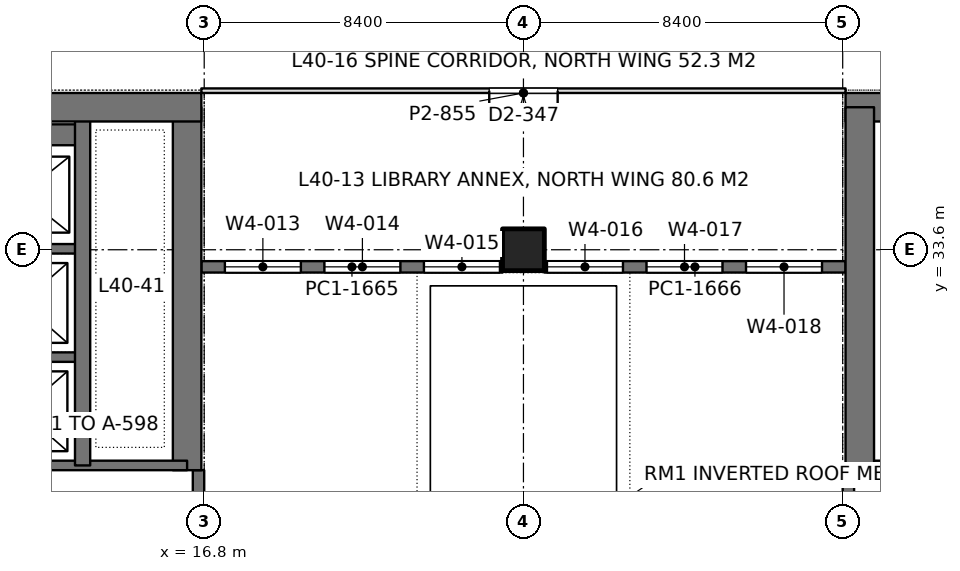
"""IFC4 building model, lengths in metres.
Left out: names, types, materials, properties, quantities, classifications, styles, units other than length and angle.
Written with IfcOpenShell. Run it as: python <this file> out.ifc"""

import sys

from ifc_helpers import new_model, si_unit, direction, frame, frame_2d, origin, origin_2d, place, context, subcontext, project, spatial, rectangle, extrude, element, fill, save


model = new_model("IFC4")
c1 = context("Model", 3, precision=1e-05, world=origin(), true_north=direction((0.0, 1.0)))
c2 = subcontext(c1, "Body", "Model", "MODEL_VIEW")
j1 = project(units=[si_unit("LENGTHUNIT", "METRE"), si_unit("PLANEANGLEUNIT", "RADIAN")], contexts=[c1])
p1 = place(None, origin())
s1 = spatial("IfcSite", under=j1, at=p1, CompositionType="ELEMENT")
p2 = place(p1, origin())
s2 = spatial("IfcBuilding", under=s1, at=p2, CompositionType="ELEMENT")
p3 = place(p2, frame((0.0, 0.0, 177.6)))
s3 = spatial("IfcBuildingStorey", under=s2, at=p3, CompositionType="ELEMENT", Elevation=177.6)
p4 = place(p3, frame((25.2, 33.6, 0.0), z_axis=(0.0, 0.0, 1.0), x_axis=(1.0, 0.0, 0.0)))
e1 = element("IfcColumn", 1, at=p4, inside=s3, PredefinedType="COLUMN", context=c2, shape_type="SweptSolid", body=[
    extrude(rectangle(XDim=1.1, YDim=1.1, at=origin_2d()), origin(), (0.0, 0.0, 1.0), 4.2),
])
p5 = place(p3, frame((-1.125, 37.35, 0.0), z_axis=(0.0, 0.0, 1.0), x_axis=(1.0, 0.0, 0.0)))
e2 = element("IfcWall", 2, at=p5, inside=s3, PredefinedType="SHEAR", context=c2, shape_type="SweptSolid", body=[
    extrude(rectangle(XDim=17.85, YDim=0.75, at=frame_2d((8.925, 0.0))), origin(), (0.0, 0.0, 1.0), 4.2),
])
p6 = place(p5, frame((8.875, 0.0, 0.0)))
e3 = element("IfcOpeningElement", 3, at=p6, cuts=e2, PredefinedType="OPENING", context=c2, shape_type="SweptSolid", body=[
    extrude(rectangle(XDim=1.8, YDim=2.4, at=frame_2d((0.9, 1.2))), frame((0.0, 0.385, 0.0), z_axis=(0.0, -1.0, 0.0), x_axis=(1.0, 0.0, 0.0)), (0.0, 0.0, 1.0), 0.77),
])
p7 = place(p3, frame((16.35, 27.8, 0.0), z_axis=(0.0, 0.0, 1.0), x_axis=(0.0, 1.0, 0.0)))
e4 = element("IfcWall", 4, at=p7, inside=s3, PredefinedType="SHEAR", context=c2, shape_type="SweptSolid", body=[
    extrude(rectangle(XDim=9.55, YDim=0.75, at=frame_2d((4.775, 0.0))), origin(), (0.0, 0.0, 1.0), 4.2),
])
p8 = place(p3, frame((13.6, 27.925, 0.0), z_axis=(0.0, 0.0, 1.0), x_axis=(0.0, 1.0, 0.0)))
e5 = element("IfcWall", 5, at=p8, inside=s3, PredefinedType="SHEAR", context=c2, shape_type="SweptSolid", body=[
    extrude(rectangle(XDim=9.425, YDim=0.4, at=frame_2d((4.712, 0.0))), origin(), (0.0, 0.0, 1.0), 4.2),
])
p9 = place(p3, frame((10.4, 27.925, 0.0), z_axis=(0.0, 0.0, 1.0), x_axis=(1.0, 0.0, 0.0)))
e6 = element("IfcWall", 6, at=p9, inside=s3, PredefinedType="SHEAR", context=c2, shape_type="SweptSolid", body=[
    extrude(rectangle(XDim=5.95, YDim=0.25, at=frame_2d((2.975, 0.0))), origin(), (0.0, 0.0, 1.0), 4.2),
])
for number, where, z_axis, x_axis in (
    (7, (10.4, 30.775, 0.0), (0.0, 0.0, 1.0), (1.0, 0.0, 0.0)),
    (8, (10.4, 33.625, 0.0), (0.0, 0.0, 1.0), (1.0, 0.0, 0.0)),
):
    element("IfcWall", number, at=place(p3, frame(where, z_axis=z_axis, x_axis=x_axis)), inside=s3, PredefinedType="SHEAR", context=c2, shape_type="SweptSolid", body=[
        extrude(rectangle(XDim=3.2, YDim=0.25, at=frame_2d((1.6, 0.0))), origin(), (0.0, 0.0, 1.0), 4.2),
    ])
p10 = place(p3, frame((10.4, 36.625, 0.0), z_axis=(0.0, 0.0, 1.0), x_axis=(1.0, 0.0, 0.0)))
e9 = element("IfcWall", 9, at=p10, inside=s3, PredefinedType="SHEAR", context=c2, shape_type="SweptSolid", body=[
    extrude(rectangle(XDim=3.2, YDim=0.55, at=frame_2d((1.6, 0.0))), origin(), (0.0, 0.0, 1.0), 4.2),
])
p11 = place(p3, frame((33.675, 37.35, 0.0), z_axis=(0.0, 0.0, 1.0), x_axis=(1.0, 0.0, 0.0)))
e10 = element("IfcWall", 10, at=p11, inside=s3, PredefinedType="SHEAR", context=c2, shape_type="SweptSolid", body=[
    extrude(rectangle(XDim=17.85, YDim=0.75, at=frame_2d((8.925, 0.0))), origin(), (0.0, 0.0, 1.0), 4.2),
])
p12 = place(p11, frame((7.175, 0.0, 0.0)))
e11 = element("IfcOpeningElement", 11, at=p12, cuts=e10, PredefinedType="OPENING", context=c2, shape_type="SweptSolid", body=[
    extrude(rectangle(XDim=1.8, YDim=2.4, at=frame_2d((0.9, 1.2))), frame((0.0, 0.385, 0.0), z_axis=(0.0, -1.0, 0.0), x_axis=(1.0, 0.0, 0.0)), (0.0, 0.0, 1.0), 0.77),
])
p13 = place(p3, frame((34.05, 27.8, 0.0), z_axis=(0.0, 0.0, 1.0), x_axis=(0.0, 1.0, 0.0)))
e12 = element("IfcWall", 12, at=p13, inside=s3, PredefinedType="SHEAR", context=c2, shape_type="SweptSolid", body=[
    extrude(rectangle(XDim=9.55, YDim=0.75, at=frame_2d((4.775, 0.0))), origin(), (0.0, 0.0, 1.0), 4.2),
])
p14 = place(p3, frame((40.0, 27.925, 0.0), z_axis=(0.0, 0.0, 1.0), x_axis=(-1.0, 0.0, 0.0)))
e13 = element("IfcWall", 13, at=p14, inside=s3, PredefinedType="SHEAR", context=c2, shape_type="SweptSolid", body=[
    extrude(rectangle(XDim=5.95, YDim=0.25, at=frame_2d((2.975, 0.0))), origin(), (0.0, 0.0, 1.0), 4.2),
])
p15 = place(p3, frame((16.65, 17.1, 0.0), z_axis=(0.0, 0.0, 1.0), x_axis=(0.0, 1.0, 0.0)))
e14 = element("IfcWall", 14, at=p15, inside=s3, PredefinedType="SOLIDWALL", context=c2, shape_type="SweptSolid", body=[
    extrude(rectangle(XDim=10.7, YDim=0.3, at=frame_2d((5.35, 0.0))), origin(), (0.0, 0.0, 1.0), 4.05),
])
p16 = place(p15, frame((0.55, 0.0, 0.9)))
e15 = element("IfcOpeningElement", 15, at=p16, cuts=e14, PredefinedType="OPENING", context=c2, shape_type="SweptSolid", body=[
    extrude(rectangle(XDim=2.0, YDim=1.9, at=frame_2d((1.0, 0.95))), frame((0.0, 0.16, 0.0), z_axis=(0.0, -1.0, 0.0), x_axis=(1.0, 0.0, 0.0)), (0.0, 0.0, 1.0), 0.32),
])
p17 = place(p15, frame((2.9, 0.0, 0.9)))
e16 = element("IfcOpeningElement", 16, at=p17, cuts=e14, PredefinedType="OPENING", context=c2, shape_type="SweptSolid", body=[
    extrude(rectangle(XDim=2.0, YDim=1.9, at=frame_2d((1.0, 0.95))), frame((0.0, 0.16, 0.0), z_axis=(0.0, -1.0, 0.0), x_axis=(1.0, 0.0, 0.0)), (0.0, 0.0, 1.0), 0.32),
])
p18 = place(p15, frame((7.675, 0.0, 0.9)))
e17 = element("IfcOpeningElement", 17, at=p18, cuts=e14, PredefinedType="OPENING", context=c2, shape_type="SweptSolid", body=[
    extrude(rectangle(XDim=2.0, YDim=1.9, at=frame_2d((1.0, 0.95))), frame((0.0, 0.16, 0.0), z_axis=(0.0, -1.0, 0.0), x_axis=(1.0, 0.0, 0.0)), (0.0, 0.0, 1.0), 0.32),
])
p19 = place(p3, frame((33.75, 17.1, 0.0), z_axis=(0.0, 0.0, 1.0), x_axis=(0.0, 1.0, 0.0)))
e18 = element("IfcWall", 18, at=p19, inside=s3, PredefinedType="SOLIDWALL", context=c2, shape_type="SweptSolid", body=[
    extrude(rectangle(XDim=10.7, YDim=0.3, at=frame_2d((5.35, 0.0))), origin(), (0.0, 0.0, 1.0), 4.05),
])
p20 = place(p19, frame((0.55, 0.0, 0.9)))
e19 = element("IfcOpeningElement", 19, at=p20, cuts=e18, PredefinedType="OPENING", context=c2, shape_type="SweptSolid", body=[
    extrude(rectangle(XDim=2.0, YDim=1.9, at=frame_2d((1.0, 0.95))), frame((0.0, 0.16, 0.0), z_axis=(0.0, -1.0, 0.0), x_axis=(1.0, 0.0, 0.0)), (0.0, 0.0, 1.0), 0.32),
])
p21 = place(p19, frame((2.9, 0.0, 0.9)))
e20 = element("IfcOpeningElement", 20, at=p21, cuts=e18, PredefinedType="OPENING", context=c2, shape_type="SweptSolid", body=[
    extrude(rectangle(XDim=2.0, YDim=1.9, at=frame_2d((1.0, 0.95))), frame((0.0, 0.16, 0.0), z_axis=(0.0, -1.0, 0.0), x_axis=(1.0, 0.0, 0.0)), (0.0, 0.0, 1.0), 0.32),
])
p22 = place(p19, frame((7.675, 0.0, 0.9)))
e21 = element("IfcOpeningElement", 21, at=p22, cuts=e18, PredefinedType="OPENING", context=c2, shape_type="SweptSolid", body=[
    extrude(rectangle(XDim=2.0, YDim=1.9, at=frame_2d((1.0, 0.95))), frame((0.0, 0.16, 0.0), z_axis=(0.0, -1.0, 0.0), x_axis=(1.0, 0.0, 0.0)), (0.0, 0.0, 1.0), 0.32),
])
p23 = place(p3, frame((16.725, 33.15, 0.0), z_axis=(0.0, 0.0, 1.0), x_axis=(1.0, 0.0, 0.0)))
e22 = element("IfcWall", 22, at=p23, inside=s3, PredefinedType="SOLIDWALL", context=c2, shape_type="SweptSolid", body=[
    extrude(rectangle(XDim=7.925, YDim=0.3, at=frame_2d((3.962, 0.0))), origin(), (0.0, 0.0, 1.0), 4.05),
])
p24 = place(p23, frame((0.619, 0.0, 0.9)))
e23 = element("IfcOpeningElement", 23, at=p24, cuts=e22, PredefinedType="OPENING", context=c2, shape_type="SweptSolid", body=[
    extrude(rectangle(XDim=2.0, YDim=1.9, at=frame_2d((1.0, 0.95))), frame((0.0, 0.16, 0.0), z_axis=(0.0, -1.0, 0.0), x_axis=(1.0, 0.0, 0.0)), (0.0, 0.0, 1.0), 0.32),
])
p25 = place(p23, frame((3.238, 0.0, 0.9)))
e24 = element("IfcOpeningElement", 24, at=p25, cuts=e22, PredefinedType="OPENING", context=c2, shape_type="SweptSolid", body=[
    extrude(rectangle(XDim=2.0, YDim=1.9, at=frame_2d((1.0, 0.95))), frame((0.0, 0.16, 0.0), z_axis=(0.0, -1.0, 0.0), x_axis=(1.0, 0.0, 0.0)), (0.0, 0.0, 1.0), 0.32),
])
p26 = place(p23, frame((5.856, 0.0, 0.9)))
e25 = element("IfcOpeningElement", 25, at=p26, cuts=e22, PredefinedType="OPENING", context=c2, shape_type="SweptSolid", body=[
    extrude(rectangle(XDim=2.0, YDim=1.9, at=frame_2d((1.0, 0.95))), frame((0.0, 0.16, 0.0), z_axis=(0.0, -1.0, 0.0), x_axis=(1.0, 0.0, 0.0)), (0.0, 0.0, 1.0), 0.32),
])
p27 = place(p3, frame((25.75, 33.15, 0.0), z_axis=(0.0, 0.0, 1.0), x_axis=(1.0, 0.0, 0.0)))
e26 = element("IfcWall", 26, at=p27, inside=s3, PredefinedType="SOLIDWALL", context=c2, shape_type="SweptSolid", body=[
    extrude(rectangle(XDim=7.925, YDim=0.3, at=frame_2d((3.962, 0.0))), origin(), (0.0, 0.0, 1.0), 4.05),
])
p28 = place(p27, frame((0.069, 0.0, 0.9)))
e27 = element("IfcOpeningElement", 27, at=p28, cuts=e26, PredefinedType="OPENING", context=c2, shape_type="SweptSolid", body=[
    extrude(rectangle(XDim=2.0, YDim=1.9, at=frame_2d((1.0, 0.95))), frame((0.0, 0.16, 0.0), z_axis=(0.0, -1.0, 0.0), x_axis=(1.0, 0.0, 0.0)), (0.0, 0.0, 1.0), 0.32),
])
p29 = place(p27, frame((2.688, 0.0, 0.9)))
e28 = element("IfcOpeningElement", 28, at=p29, cuts=e26, PredefinedType="OPENING", context=c2, shape_type="SweptSolid", body=[
    extrude(rectangle(XDim=2.0, YDim=1.9, at=frame_2d((1.0, 0.95))), frame((0.0, 0.16, 0.0), z_axis=(0.0, -1.0, 0.0), x_axis=(1.0, 0.0, 0.0)), (0.0, 0.0, 1.0), 0.32),
])
p30 = place(p27, frame((5.306, 0.0, 0.9)))
e29 = element("IfcOpeningElement", 29, at=p30, cuts=e26, PredefinedType="OPENING", context=c2, shape_type="SweptSolid", body=[
    extrude(rectangle(XDim=2.0, YDim=1.9, at=frame_2d((1.0, 0.95))), frame((0.0, 0.16, 0.0), z_axis=(0.0, -1.0, 0.0), x_axis=(1.0, 0.0, 0.0)), (0.0, 0.0, 1.0), 0.32),
])
p31 = place(p3, frame((16.725, 37.785, 0.0), z_axis=(0.0, 0.0, 1.0), x_axis=(1.0, 0.0, 0.0)))
e30 = element("IfcWall", 30, at=p31, inside=s3, PredefinedType="PARTITIONING", context=c2, shape_type="SweptSolid", body=[
    extrude(rectangle(XDim=16.95, YDim=0.12, at=frame_2d((8.475, 0.0))), origin(), (0.0, 0.0, 1.0), 3.55),
])
p32 = place(p31, frame((7.575, 0.0, 0.0)))
e31 = element("IfcOpeningElement", 31, at=p32, cuts=e30, PredefinedType="OPENING", context=c2, shape_type="SweptSolid", body=[
    extrude(rectangle(XDim=1.8, YDim=2.2, at=frame_2d((0.9, 1.1))), frame((0.0, 0.07, 0.0), z_axis=(0.0, -1.0, 0.0), x_axis=(1.0, 0.0, 0.0)), (0.0, 0.0, 1.0), 0.14),
])
p33 = place(p24, origin())
e32 = element("IfcWindow", 32, at=p33, inside=s3, PartitioningType="SINGLE_PANEL", PredefinedType="WINDOW", context=c2, shape_type="SweptSolid", body=[
    extrude(rectangle(XDim=2.0, YDim=1.9, at=frame_2d((1.0, 0.95))), frame((0.0, 0.03, 0.0), z_axis=(0.0, -1.0, 0.0), x_axis=(1.0, 0.0, 0.0)), (0.0, 0.0, 1.0), 0.06),
])
fill(e23, e32)
p34 = place(p25, origin())
e33 = element("IfcWindow", 33, at=p34, inside=s3, PartitioningType="SINGLE_PANEL", PredefinedType="WINDOW", context=c2, shape_type="SweptSolid", body=[
    extrude(rectangle(XDim=2.0, YDim=1.9, at=frame_2d((1.0, 0.95))), frame((0.0, 0.03, 0.0), z_axis=(0.0, -1.0, 0.0), x_axis=(1.0, 0.0, 0.0)), (0.0, 0.0, 1.0), 0.06),
])
fill(e24, e33)
p35 = place(p26, origin())
e34 = element("IfcWindow", 34, at=p35, inside=s3, PartitioningType="SINGLE_PANEL", PredefinedType="WINDOW", context=c2, shape_type="SweptSolid", body=[
    extrude(rectangle(XDim=2.0, YDim=1.9, at=frame_2d((1.0, 0.95))), frame((0.0, 0.03, 0.0), z_axis=(0.0, -1.0, 0.0), x_axis=(1.0, 0.0, 0.0)), (0.0, 0.0, 1.0), 0.06),
])
fill(e25, e34)
p36 = place(p28, origin())
e35 = element("IfcWindow", 35, at=p36, inside=s3, PartitioningType="SINGLE_PANEL", PredefinedType="WINDOW", context=c2, shape_type="SweptSolid", body=[
    extrude(rectangle(XDim=2.0, YDim=1.9, at=frame_2d((1.0, 0.95))), frame((0.0, 0.03, 0.0), z_axis=(0.0, -1.0, 0.0), x_axis=(1.0, 0.0, 0.0)), (0.0, 0.0, 1.0), 0.06),
])
fill(e27, e35)
p37 = place(p29, origin())
e36 = element("IfcWindow", 36, at=p37, inside=s3, PartitioningType="SINGLE_PANEL", PredefinedType="WINDOW", context=c2, shape_type="SweptSolid", body=[
    extrude(rectangle(XDim=2.0, YDim=1.9, at=frame_2d((1.0, 0.95))), frame((0.0, 0.03, 0.0), z_axis=(0.0, -1.0, 0.0), x_axis=(1.0, 0.0, 0.0)), (0.0, 0.0, 1.0), 0.06),
])
fill(e28, e36)
p38 = place(p30, origin())
e37 = element("IfcWindow", 37, at=p38, inside=s3, PartitioningType="SINGLE_PANEL", PredefinedType="WINDOW", context=c2, shape_type="SweptSolid", body=[
    extrude(rectangle(XDim=2.0, YDim=1.9, at=frame_2d((1.0, 0.95))), frame((0.0, 0.03, 0.0), z_axis=(0.0, -1.0, 0.0), x_axis=(1.0, 0.0, 0.0)), (0.0, 0.0, 1.0), 0.06),
])
fill(e29, e37)
p39 = place(p32, frame((1.8, 0.0, 0.0), z_axis=(0.0, 0.0, 1.0), x_axis=(-1.0, 0.0, 0.0)))
e38 = element("IfcDoor", 38, at=p39, inside=s3, OperationType="DOUBLE_DOOR_SINGLE_SWING", PredefinedType="DOOR", context=c2, shape_type="SweptSolid", body=[
    extrude(rectangle(XDim=1.8, YDim=2.2, at=frame_2d((0.9, 1.1))), frame((0.0, 0.025, 0.0), z_axis=(0.0, -1.0, 0.0), x_axis=(1.0, 0.0, 0.0)), (0.0, 0.0, 1.0), 0.05),
])
fill(e31, e38)
save(model, sys.argv[1])
